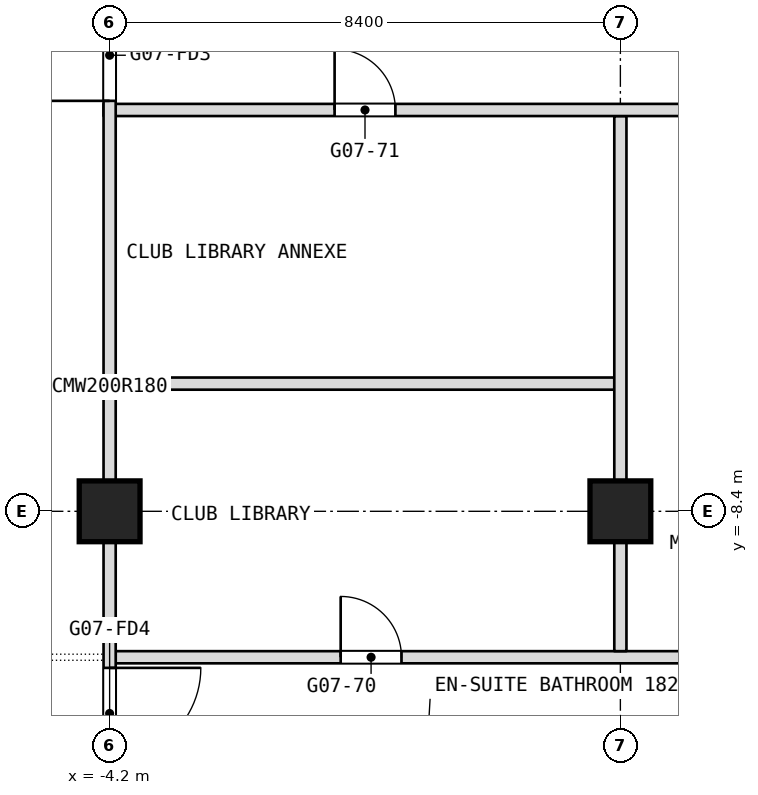
"""IFC4 building model, lengths in metres.
Left out: names, types, materials, properties, quantities, classifications, styles, units other than length and angle.
Written with IfcOpenShell. Run it as: python <this file> out.ifc"""

import sys

from ifc_helpers import new_model, si_unit, direction, frame, frame_2d, origin, origin_2d, place, context, subcontext, project, spatial, rectangle, extrude, element, fill, save


model = new_model("IFC4")
c1 = context("Model", 3, precision=1e-05, world=origin(), true_north=direction((0.0, 1.0)))
c2 = subcontext(c1, "Body", "Model", "MODEL_VIEW")
j1 = project(units=[si_unit("LENGTHUNIT", "METRE"), si_unit("PLANEANGLEUNIT", "RADIAN")], contexts=[c1])
p1 = place(None, origin())
s1 = spatial("IfcSite", under=j1, at=p1, CompositionType="ELEMENT")
p2 = place(p1, origin())
s2 = spatial("IfcBuilding", under=s1, at=p2, CompositionType="ELEMENT")
p3 = place(p2, frame((0.0, 0.0, 79.7)))
s3 = spatial("IfcBuildingStorey", under=s2, at=p3, CompositionType="ELEMENT", Elevation=79.7)
for number, where, z_axis, x_axis in (
    (1, (-4.2, -8.4, 0.0), (0.0, 0.0, 1.0), (1.0, 0.0, 0.0)),
    (2, (4.2, -8.4, 0.0), (0.0, 0.0, 1.0), (1.0, 0.0, 0.0)),
):
    element("IfcColumn", number, at=place(p3, frame(where, z_axis=z_axis, x_axis=x_axis)), inside=s3, PredefinedType="COLUMN", context=c2, shape_type="SweptSolid", body=[
        extrude(rectangle(XDim=1.0, YDim=1.0, at=origin_2d()), origin(), (0.0, 0.0, 1.0), 3.6),
    ])
p4 = place(p3, frame((-4.1, -10.8, 0.0), z_axis=(0.0, 0.0, 1.0), x_axis=(1.0, 0.0, 0.0)))
e3 = element("IfcWall", 3, at=p4, inside=s3, PredefinedType="PARTITIONING", context=c2, shape_type="SweptSolid", body=[
    extrude(rectangle(XDim=20.8, YDim=0.2, at=frame_2d((10.4, 0.0))), origin(), (0.0, 0.0, 1.0), 3.34),
])
p5 = place(p4, frame((3.7, 0.0, 0.0)))
e4 = element("IfcOpeningElement", 4, at=p5, cuts=e3, PredefinedType="OPENING", context=c2, shape_type="SweptSolid", body=[
    extrude(rectangle(XDim=1.0, YDim=2.1, at=frame_2d((0.5, 1.05))), frame((0.0, 0.1, 0.0), z_axis=(0.0, -1.0, 0.0), x_axis=(1.0, 0.0, 0.0)), (0.0, 0.0, 1.0), 0.2),
])
p6 = place(p3, frame((-4.1, -6.3, 0.0), z_axis=(0.0, 0.0, 1.0), x_axis=(1.0, 0.0, 0.0)))
e5 = element("IfcWall", 5, at=p6, inside=s3, PredefinedType="PARTITIONING", context=c2, shape_type="SweptSolid", body=[
    extrude(rectangle(XDim=8.2, YDim=0.2, at=frame_2d((4.1, 0.0))), origin(), (0.0, 0.0, 1.0), 3.34),
])
p7 = place(p3, frame((4.2, -10.7, 0.0), z_axis=(0.0, 0.0, 1.0), x_axis=(0.0, 1.0, 0.0)))
e6 = element("IfcWall", 6, at=p7, inside=s3, PredefinedType="PARTITIONING", context=c2, shape_type="SweptSolid", body=[
    extrude(rectangle(XDim=8.8, YDim=0.2, at=frame_2d((4.4, 0.0))), origin(), (0.0, 0.0, 1.0), 3.34),
])
p8 = place(p3, frame((-4.3, -1.8, 0.0), z_axis=(0.0, 0.0, 1.0), x_axis=(1.0, 0.0, 0.0)))
e7 = element("IfcWall", 7, at=p8, inside=s3, PredefinedType="PARTITIONING", context=c2, shape_type="SweptSolid", body=[
    extrude(rectangle(XDim=10.9, YDim=0.2, at=frame_2d((5.45, 0.0))), origin(), (0.0, 0.0, 1.0), 3.34),
])
p9 = place(p8, frame((9.65, 0.0, 0.0)))
e8 = element("IfcOpeningElement", 8, at=p9, cuts=e7, PredefinedType="OPENING", context=c2, shape_type="SweptSolid", body=[
    extrude(rectangle(XDim=1.0, YDim=2.1, at=frame_2d((0.5, 1.05))), frame((0.0, 0.1, 0.0), z_axis=(0.0, -1.0, 0.0), x_axis=(1.0, 0.0, 0.0)), (0.0, 0.0, 1.0), 0.2),
])
p10 = place(p8, frame((3.8, 0.0, 0.0)))
e9 = element("IfcOpeningElement", 9, at=p10, cuts=e7, PredefinedType="OPENING", context=c2, shape_type="SweptSolid", body=[
    extrude(rectangle(XDim=1.0, YDim=2.1, at=frame_2d((0.5, 1.05))), frame((0.0, 0.1, 0.0), z_axis=(0.0, -1.0, 0.0), x_axis=(1.0, 0.0, 0.0)), (0.0, 0.0, 1.0), 0.2),
])
p11 = place(p3, frame((-4.2, -12.7, 0.0), z_axis=(0.0, 0.0, 1.0), x_axis=(0.0, 1.0, 0.0)))
e10 = element("IfcWall", 10, at=p11, inside=s3, PredefinedType="PARTITIONING", context=c2, shape_type="SweptSolid", body=[
    extrude(rectangle(XDim=12.7, YDim=0.2, at=frame_2d((6.35, 0.0))), origin(), (0.0, 0.0, 1.0), 3.34),
])
p12 = place(p11, frame((11.05, 0.0, 0.0)))
e11 = element("IfcOpeningElement", 11, at=p12, cuts=e10, PredefinedType="OPENING", context=c2, shape_type="SweptSolid", body=[
    extrude(rectangle(XDim=1.5, YDim=2.1, at=frame_2d((0.75, 1.05))), frame((0.0, 0.1, 0.0), z_axis=(0.0, -1.0, 0.0), x_axis=(1.0, 0.0, 0.0)), (0.0, 0.0, 1.0), 0.2),
])
p13 = place(p11, frame((0.225, 0.0, 0.0)))
e12 = element("IfcOpeningElement", 12, at=p13, cuts=e10, PredefinedType="OPENING", context=c2, shape_type="SweptSolid", body=[
    extrude(rectangle(XDim=1.5, YDim=2.1, at=frame_2d((0.75, 1.05))), frame((0.0, 0.1, 0.0), z_axis=(0.0, -1.0, 0.0), x_axis=(1.0, 0.0, 0.0)), (0.0, 0.0, 1.0), 0.2),
])
p14 = place(p5, origin())
e13 = element("IfcDoor", 13, at=p14, inside=s3, OperationType="SINGLE_SWING_RIGHT", PredefinedType="DOOR", context=c2, shape_type="SweptSolid", body=[
    extrude(rectangle(XDim=1.0, YDim=2.1, at=frame_2d((0.5, 1.05))), frame((0.0, 0.025, 0.0), z_axis=(0.0, -1.0, 0.0), x_axis=(1.0, 0.0, 0.0)), (0.0, 0.0, 1.0), 0.05),
])
fill(e4, e13)
p15 = place(p10, origin())
e14 = element("IfcDoor", 14, at=p15, inside=s3, OperationType="SINGLE_SWING_LEFT", PredefinedType="DOOR", context=c2, shape_type="SweptSolid", body=[
    extrude(rectangle(XDim=1.0, YDim=2.1, at=frame_2d((0.5, 1.05))), frame((0.0, 0.025, 0.0), z_axis=(0.0, -1.0, 0.0), x_axis=(1.0, 0.0, 0.0)), (0.0, 0.0, 1.0), 0.05),
])
fill(e9, e14)
p16 = place(p12, origin())
e15 = element("IfcDoor", 15, at=p16, inside=s3, OperationType="DOUBLE_DOOR_DOUBLE_SWING", PredefinedType="DOOR", context=c2, shape_type="SweptSolid", body=[
    extrude(rectangle(XDim=1.5, YDim=2.1, at=frame_2d((0.75, 1.05))), frame((0.0, 0.025, 0.0), z_axis=(0.0, -1.0, 0.0), x_axis=(1.0, 0.0, 0.0)), (0.0, 0.0, 1.0), 0.05),
])
fill(e11, e15)
p17 = place(p13, origin())
e16 = element("IfcDoor", 16, at=p17, inside=s3, OperationType="DOUBLE_DOOR_DOUBLE_SWING", PredefinedType="DOOR", context=c2, shape_type="SweptSolid", body=[
    extrude(rectangle(XDim=1.5, YDim=2.1, at=frame_2d((0.75, 1.05))), frame((0.0, 0.025, 0.0), z_axis=(0.0, -1.0, 0.0), x_axis=(1.0, 0.0, 0.0)), (0.0, 0.0, 1.0), 0.05),
])
fill(e12, e16)
save(model, sys.argv[1])
